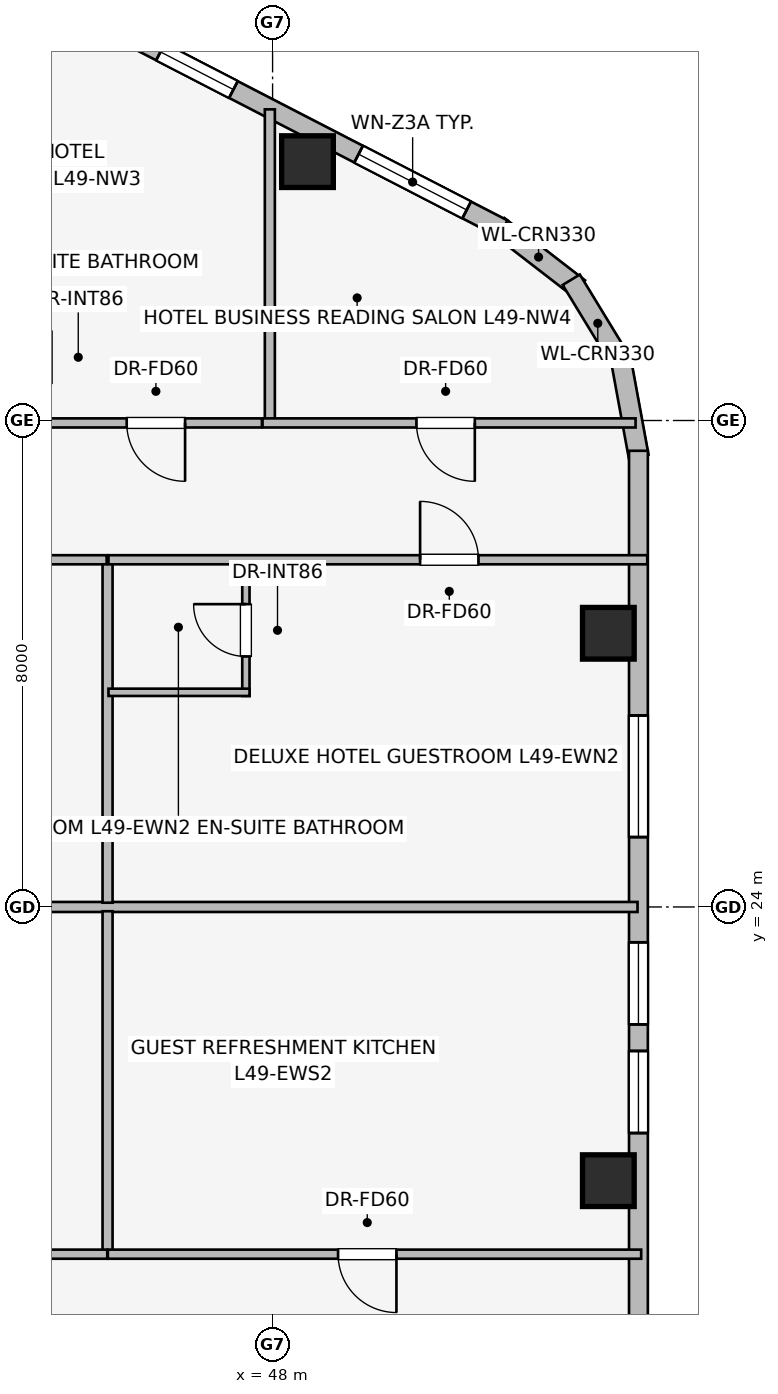
"""IFC4 building model, lengths in metres.
Left out: names, types, materials, properties, quantities, classifications, styles, units other than length and angle.
Written with IfcOpenShell. Run it as: python <this file> out.ifc"""

import sys

from ifc_helpers import new_model, si_unit, direction, frame, frame_2d, origin, origin_2d, place, context, subcontext, project, spatial, rectangle, extrude, element, fill, save


model = new_model("IFC4")
c1 = context("Model", 3, precision=1e-05, world=origin(), true_north=direction((0.0, 1.0)))
c2 = subcontext(c1, "Body", "Model", "MODEL_VIEW")
j1 = project(units=[si_unit("LENGTHUNIT", "METRE"), si_unit("PLANEANGLEUNIT", "RADIAN")], contexts=[c1])
p1 = place(None, origin())
s1 = spatial("IfcSite", under=j1, at=p1, CompositionType="ELEMENT")
p2 = place(p1, origin())
s2 = spatial("IfcBuilding", under=s1, at=p2, CompositionType="ELEMENT")
p3 = place(p2, frame((0.0, 0.0, 180.9)))
s3 = spatial("IfcBuildingStorey", under=s2, at=p3, CompositionType="ELEMENT", Elevation=180.9)
for number, where, z_axis, x_axis in (
    (1, (48.574, 36.257, 0.0), (0.0, 0.0, 1.0), (1.0, 0.0, 0.0)),
    (2, (53.522, 19.499, 0.0), (0.0, 0.0, 1.0), (1.0, 0.0, 0.0)),
    (3, (53.522, 28.501, 0.0), (0.0, 0.0, 1.0), (1.0, 0.0, 0.0)),
):
    element("IfcColumn", number, at=place(p3, frame(where, z_axis=z_axis, x_axis=x_axis)), inside=s3, PredefinedType="COLUMN", context=c2, shape_type="SweptSolid", body=[
        extrude(rectangle(XDim=0.85, YDim=0.85, at=origin_2d()), origin(), (0.0, 0.0, 1.0), 3.45),
    ])
p4 = place(p3, frame((51.711, 35.2, 0.0), z_axis=(0.0, 0.0, 1.0), x_axis=(0.791464279355, -0.611215423976, 0.0)))
e4 = element("IfcWall", 4, at=p4, inside=s3, PredefinedType="STANDARD", context=c2, shape_type="SweptSolid", body=[
    extrude(rectangle(XDim=1.677, YDim=0.33, at=frame_2d((0.838, 0.0))), origin(), (0.0, 0.0, 1.0), 3.19),
])
p5 = place(p3, frame((52.912, 34.315, 0.0), z_axis=(0.0, 0.0, 1.0), x_axis=(0.520219286058, -0.85403272444, 0.0)))
e5 = element("IfcWall", 5, at=p5, inside=s3, PredefinedType="STANDARD", context=c2, shape_type="SweptSolid", body=[
    extrude(rectangle(XDim=1.678, YDim=0.33, at=frame_2d((0.839, 0.0))), origin(), (0.0, 0.0, 1.0), 3.19),
])
p6 = place(p3, frame((53.718, 33.057, 0.0), z_axis=(0.0, 0.0, 1.0), x_axis=(0.180717642671, -0.983535019014, 0.0)))
e6 = element("IfcWall", 6, at=p6, inside=s3, PredefinedType="STANDARD", context=c2, shape_type="SweptSolid", body=[
    extrude(rectangle(XDim=1.677, YDim=0.33, at=frame_2d((0.838, 0.0))), origin(), (0.0, 0.0, 1.0), 3.19),
])
p7 = place(p3, frame((36.838, 42.871, 0.0), z_axis=(0.0, 0.0, 1.0), x_axis=(0.888626188278, -0.458632202867, 0.0)))
e7 = element("IfcWall", 7, at=p7, inside=s3, PredefinedType="STANDARD", context=c2, shape_type="SweptSolid", body=[
    extrude(rectangle(XDim=16.828, YDim=0.31, at=frame_2d((8.414, 0.0))), origin(), (0.0, 0.0, 1.0), 3.19),
])
p8 = place(p7, frame((4.172, 0.0, 0.75)))
e8 = element("IfcOpeningElement", 8, at=p8, cuts=e7, PredefinedType="OPENING", context=c2, shape_type="SweptSolid", body=[
    extrude(rectangle(XDim=1.05, YDim=1.4, at=frame_2d((0.525, 0.7))), frame((0.0, 0.165, 0.0), z_axis=(0.0, -1.0, 0.0), x_axis=(1.0, 0.0, 0.0)), (0.0, 0.0, 1.0), 0.33),
])
p9 = place(p7, frame((6.508, 0.0, 0.75)))
e9 = element("IfcOpeningElement", 9, at=p9, cuts=e7, PredefinedType="OPENING", context=c2, shape_type="SweptSolid", body=[
    extrude(rectangle(XDim=1.35, YDim=1.45, at=frame_2d((0.675, 0.725))), frame((0.0, 0.165, 0.0), z_axis=(0.0, -1.0, 0.0), x_axis=(1.0, 0.0, 0.0)), (0.0, 0.0, 1.0), 0.33),
])
p10 = place(p7, frame((8.497, 0.0, 0.75)))
e10 = element("IfcOpeningElement", 10, at=p10, cuts=e7, PredefinedType="OPENING", context=c2, shape_type="SweptSolid", body=[
    extrude(rectangle(XDim=1.35, YDim=1.45, at=frame_2d((0.675, 0.725))), frame((0.0, 0.165, 0.0), z_axis=(0.0, -1.0, 0.0), x_axis=(1.0, 0.0, 0.0)), (0.0, 0.0, 1.0), 0.33),
])
p11 = place(p7, frame((10.486, 0.0, 0.75)))
e11 = element("IfcOpeningElement", 11, at=p11, cuts=e7, PredefinedType="OPENING", context=c2, shape_type="SweptSolid", body=[
    extrude(rectangle(XDim=1.35, YDim=1.45, at=frame_2d((0.675, 0.725))), frame((0.0, 0.165, 0.0), z_axis=(0.0, -1.0, 0.0), x_axis=(1.0, 0.0, 0.0)), (0.0, 0.0, 1.0), 0.33),
])
p12 = place(p7, frame((14.153, 0.0, 0.75)))
e12 = element("IfcOpeningElement", 12, at=p12, cuts=e7, PredefinedType="OPENING", context=c2, shape_type="SweptSolid", body=[
    extrude(rectangle(XDim=2.0, YDim=1.5, at=frame_2d((1.0, 0.75))), frame((0.0, 0.165, 0.0), z_axis=(0.0, -1.0, 0.0), x_axis=(1.0, 0.0, 0.0)), (0.0, 0.0, 1.0), 0.33),
])
p13 = place(p3, frame((54.017, 31.502, 0.0), z_axis=(0.0, 0.0, 1.0), x_axis=(0.0, -1.0, 0.0)))
e13 = element("IfcWall", 13, at=p13, inside=s3, PredefinedType="STANDARD", context=c2, shape_type="SweptSolid", body=[
    extrude(rectangle(XDim=15.004, YDim=0.31, at=frame_2d((7.502, 0.0))), origin(), (0.0, 0.0, 1.0), 3.19),
])
p14 = place(p13, frame((4.353, 0.0, 0.75)))
e14 = element("IfcOpeningElement", 14, at=p14, cuts=e13, PredefinedType="OPENING", context=c2, shape_type="SweptSolid", body=[
    extrude(rectangle(XDim=2.0, YDim=1.5, at=frame_2d((1.0, 0.75))), frame((0.0, 0.165, 0.0), z_axis=(0.0, -1.0, 0.0), x_axis=(1.0, 0.0, 0.0)), (0.0, 0.0, 1.0), 0.33),
])
p15 = place(p13, frame((8.083, 0.0, 0.75)))
e15 = element("IfcOpeningElement", 15, at=p15, cuts=e13, PredefinedType="OPENING", context=c2, shape_type="SweptSolid", body=[
    extrude(rectangle(XDim=1.35, YDim=1.45, at=frame_2d((0.675, 0.725))), frame((0.0, 0.165, 0.0), z_axis=(0.0, -1.0, 0.0), x_axis=(1.0, 0.0, 0.0)), (0.0, 0.0, 1.0), 0.33),
])
p16 = place(p13, frame((9.87, 0.0, 0.75)))
e16 = element("IfcOpeningElement", 16, at=p16, cuts=e13, PredefinedType="OPENING", context=c2, shape_type="SweptSolid", body=[
    extrude(rectangle(XDim=1.35, YDim=1.45, at=frame_2d((0.675, 0.725))), frame((0.0, 0.165, 0.0), z_axis=(0.0, -1.0, 0.0), x_axis=(1.0, 0.0, 0.0)), (0.0, 0.0, 1.0), 0.33),
])
p17 = place(p3, frame((47.955, 31.97, 0.0), z_axis=(0.0, 0.0, 1.0), x_axis=(0.0, 1.0, 0.0)))
e17 = element("IfcWall", 17, at=p17, inside=s3, PredefinedType="PARTITIONING", context=c2, shape_type="SweptSolid", body=[
    extrude(rectangle(XDim=5.147, YDim=0.165, at=frame_2d((2.573, 0.0))), origin(), (0.0, 0.0, 1.0), 3.19),
])
p18 = place(p3, frame((47.825, 31.96, 0.0), z_axis=(0.0, 0.0, 1.0), x_axis=(-1.0, 0.0, 0.0)))
e18 = element("IfcWall", 18, at=p18, inside=s3, PredefinedType="PARTITIONING", context=c2, shape_type="SweptSolid", body=[
    extrude(rectangle(XDim=5.801, YDim=0.15, at=frame_2d((2.9, 0.0))), origin(), (0.0, 0.0, 1.0), 3.19),
])
p19 = place(p18, frame((1.264, 0.0, 0.0)))
e19 = element("IfcOpeningElement", 19, at=p19, cuts=e18, PredefinedType="OPENING", context=c2, shape_type="SweptSolid", body=[
    extrude(rectangle(XDim=0.96, YDim=2.0, at=frame_2d((0.48, 1.0))), frame((0.0, 0.085, 0.0), z_axis=(0.0, -1.0, 0.0), x_axis=(1.0, 0.0, 0.0)), (0.0, 0.0, 1.0), 0.17),
])
p20 = place(p3, frame((53.97, 31.96, 0.0), z_axis=(0.0, 0.0, 1.0), x_axis=(-1.0, 0.0, 0.0)))
e20 = element("IfcWall", 20, at=p20, inside=s3, PredefinedType="PARTITIONING", context=c2, shape_type="SweptSolid", body=[
    extrude(rectangle(XDim=6.135, YDim=0.15, at=frame_2d((3.067, 0.0))), origin(), (0.0, 0.0, 1.0), 3.19),
])
p21 = place(p20, frame((2.644, 0.0, 0.0)))
e21 = element("IfcOpeningElement", 21, at=p21, cuts=e20, PredefinedType="OPENING", context=c2, shape_type="SweptSolid", body=[
    extrude(rectangle(XDim=0.96, YDim=2.0, at=frame_2d((0.48, 1.0))), frame((0.0, 0.085, 0.0), z_axis=(0.0, -1.0, 0.0), x_axis=(1.0, 0.0, 0.0)), (0.0, 0.0, 1.0), 0.17),
])
p22 = place(p3, frame((40.52, 24.0, 0.0), z_axis=(0.0, 0.0, 1.0), x_axis=(1.0, 0.0, 0.0)))
e22 = element("IfcWall", 22, at=p22, inside=s3, PredefinedType="PARTITIONING", context=c2, shape_type="SweptSolid", body=[
    extrude(rectangle(XDim=13.482, YDim=0.165, at=frame_2d((6.741, 0.0))), origin(), (0.0, 0.0, 1.0), 3.19),
])
p23 = place(p3, frame((45.286, 24.07, 0.0), z_axis=(0.0, 0.0, 1.0), x_axis=(0.0, 1.0, 0.0)))
e23 = element("IfcWall", 23, at=p23, inside=s3, PredefinedType="PARTITIONING", context=c2, shape_type="SweptSolid", body=[
    extrude(rectangle(XDim=5.64, YDim=0.165, at=frame_2d((2.82, 0.0))), origin(), (0.0, 0.0, 1.0), 3.19),
])
p24 = place(p3, frame((39.95, 29.71, 0.0), z_axis=(0.0, 0.0, 1.0), x_axis=(1.0, 0.0, 0.0)))
e24 = element("IfcWall", 24, at=p24, inside=s3, PredefinedType="PARTITIONING", context=c2, shape_type="SweptSolid", body=[
    extrude(rectangle(XDim=5.321, YDim=0.15, at=frame_2d((2.661, 0.0))), origin(), (0.0, 0.0, 1.0), 3.19),
])
p25 = place(p24, frame((2.18, 0.0, 0.0)))
e25 = element("IfcOpeningElement", 25, at=p25, cuts=e24, PredefinedType="OPENING", context=c2, shape_type="SweptSolid", body=[
    extrude(rectangle(XDim=0.96, YDim=2.0, at=frame_2d((0.48, 1.0))), frame((0.0, 0.085, 0.0), z_axis=(0.0, -1.0, 0.0), x_axis=(1.0, 0.0, 0.0)), (0.0, 0.0, 1.0), 0.17),
])
p26 = place(p3, frame((47.561, 27.47, 0.0), z_axis=(0.0, 0.0, 1.0), x_axis=(0.0, 1.0, 0.0)))
e26 = element("IfcWall", 26, at=p26, inside=s3, PredefinedType="PARTITIONING", context=c2, shape_type="SweptSolid", body=[
    extrude(rectangle(XDim=2.24, YDim=0.12, at=frame_2d((1.12, 0.0))), origin(), (0.0, 0.0, 1.0), 3.19),
])
p27 = place(p26, frame((0.65, 0.0, 0.0)))
e27 = element("IfcOpeningElement", 27, at=p27, cuts=e26, PredefinedType="OPENING", context=c2, shape_type="SweptSolid", body=[
    extrude(rectangle(XDim=0.86, YDim=2.0, at=frame_2d((0.43, 1.0))), frame((0.0, 0.07, 0.0), z_axis=(0.0, -1.0, 0.0), x_axis=(1.0, 0.0, 0.0)), (0.0, 0.0, 1.0), 0.14),
])
p28 = place(p3, frame((45.301, 27.53, 0.0), z_axis=(0.0, 0.0, 1.0), x_axis=(1.0, 0.0, 0.0)))
e28 = element("IfcWall", 28, at=p28, inside=s3, PredefinedType="PARTITIONING", context=c2, shape_type="SweptSolid", body=[
    extrude(rectangle(XDim=2.32, YDim=0.12, at=frame_2d((1.16, 0.0))), origin(), (0.0, 0.0, 1.0), 3.19),
])
p29 = place(p3, frame((45.301, 29.71, 0.0), z_axis=(0.0, 0.0, 1.0), x_axis=(1.0, 0.0, 0.0)))
e29 = element("IfcWall", 29, at=p29, inside=s3, PredefinedType="PARTITIONING", context=c2, shape_type="SweptSolid", body=[
    extrude(rectangle(XDim=8.861, YDim=0.15, at=frame_2d((4.431, 0.0))), origin(), (0.0, 0.0, 1.0), 3.19),
])
p30 = place(p29, frame((5.125, 0.0, 0.0)))
e30 = element("IfcOpeningElement", 30, at=p30, cuts=e29, PredefinedType="OPENING", context=c2, shape_type="SweptSolid", body=[
    extrude(rectangle(XDim=0.96, YDim=2.0, at=frame_2d((0.48, 1.0))), frame((0.0, 0.085, 0.0), z_axis=(0.0, -1.0, 0.0), x_axis=(1.0, 0.0, 0.0)), (0.0, 0.0, 1.0), 0.17),
])
p31 = place(p3, frame((45.286, 18.29, 0.0), z_axis=(0.0, 0.0, 1.0), x_axis=(0.0, 1.0, 0.0)))
e31 = element("IfcWall", 31, at=p31, inside=s3, PredefinedType="PARTITIONING", context=c2, shape_type="SweptSolid", body=[
    extrude(rectangle(XDim=5.64, YDim=0.165, at=frame_2d((2.82, 0.0))), origin(), (0.0, 0.0, 1.0), 3.19),
])
p32 = place(p3, frame((45.281, 18.29, 0.0), z_axis=(0.0, 0.0, 1.0), x_axis=(-1.0, 0.0, 0.0)))
e32 = element("IfcWall", 32, at=p32, inside=s3, PredefinedType="PARTITIONING", context=c2, shape_type="SweptSolid", body=[
    extrude(rectangle(XDim=5.081, YDim=0.15, at=frame_2d((2.541, 0.0))), origin(), (0.0, 0.0, 1.0), 3.19),
])
p33 = place(p32, frame((1.94, 0.0, 0.0)))
e33 = element("IfcOpeningElement", 33, at=p33, cuts=e32, PredefinedType="OPENING", context=c2, shape_type="SweptSolid", body=[
    extrude(rectangle(XDim=0.96, YDim=2.0, at=frame_2d((0.48, 1.0))), frame((0.0, 0.085, 0.0), z_axis=(0.0, -1.0, 0.0), x_axis=(1.0, 0.0, 0.0)), (0.0, 0.0, 1.0), 0.17),
])
p34 = place(p3, frame((54.062, 18.29, 0.0), z_axis=(0.0, 0.0, 1.0), x_axis=(-1.0, 0.0, 0.0)))
e34 = element("IfcWall", 34, at=p34, inside=s3, PredefinedType="PARTITIONING", context=c2, shape_type="SweptSolid", body=[
    extrude(rectangle(XDim=8.771, YDim=0.15, at=frame_2d((4.385, 0.0))), origin(), (0.0, 0.0, 1.0), 3.19),
])
p35 = place(p34, frame((4.025, 0.0, 0.0)))
e35 = element("IfcOpeningElement", 35, at=p35, cuts=e34, PredefinedType="OPENING", context=c2, shape_type="SweptSolid", body=[
    extrude(rectangle(XDim=0.96, YDim=2.0, at=frame_2d((0.48, 1.0))), frame((0.0, 0.085, 0.0), z_axis=(0.0, -1.0, 0.0), x_axis=(1.0, 0.0, 0.0)), (0.0, 0.0, 1.0), 0.17),
])
p36 = place(p11, origin())
e36 = element("IfcWindow", 36, at=p36, inside=s3, PartitioningType="SINGLE_PANEL", PredefinedType="WINDOW", context=c2, shape_type="SweptSolid", body=[
    extrude(rectangle(XDim=1.35, YDim=1.45, at=frame_2d((0.675, 0.725))), frame((0.0, 0.03, 0.0), z_axis=(0.0, -1.0, 0.0), x_axis=(1.0, 0.0, 0.0)), (0.0, 0.0, 1.0), 0.06),
])
fill(e11, e36)
p37 = place(p12, origin())
e37 = element("IfcWindow", 37, at=p37, inside=s3, PartitioningType="SINGLE_PANEL", PredefinedType="WINDOW", context=c2, shape_type="SweptSolid", body=[
    extrude(rectangle(XDim=2.0, YDim=1.5, at=frame_2d((1.0, 0.75))), frame((0.0, 0.03, 0.0), z_axis=(0.0, -1.0, 0.0), x_axis=(1.0, 0.0, 0.0)), (0.0, 0.0, 1.0), 0.06),
])
fill(e12, e37)
p38 = place(p14, origin())
e38 = element("IfcWindow", 38, at=p38, inside=s3, PartitioningType="SINGLE_PANEL", PredefinedType="WINDOW", context=c2, shape_type="SweptSolid", body=[
    extrude(rectangle(XDim=2.0, YDim=1.5, at=frame_2d((1.0, 0.75))), frame((0.0, 0.03, 0.0), z_axis=(0.0, -1.0, 0.0), x_axis=(1.0, 0.0, 0.0)), (0.0, 0.0, 1.0), 0.06),
])
fill(e14, e38)
p39 = place(p15, origin())
e39 = element("IfcWindow", 39, at=p39, inside=s3, PartitioningType="SINGLE_PANEL", PredefinedType="WINDOW", context=c2, shape_type="SweptSolid", body=[
    extrude(rectangle(XDim=1.35, YDim=1.45, at=frame_2d((0.675, 0.725))), frame((0.0, 0.03, 0.0), z_axis=(0.0, -1.0, 0.0), x_axis=(1.0, 0.0, 0.0)), (0.0, 0.0, 1.0), 0.06),
])
fill(e15, e39)
p40 = place(p16, origin())
e40 = element("IfcWindow", 40, at=p40, inside=s3, PartitioningType="SINGLE_PANEL", PredefinedType="WINDOW", context=c2, shape_type="SweptSolid", body=[
    extrude(rectangle(XDim=1.35, YDim=1.45, at=frame_2d((0.675, 0.725))), frame((0.0, 0.03, 0.0), z_axis=(0.0, -1.0, 0.0), x_axis=(1.0, 0.0, 0.0)), (0.0, 0.0, 1.0), 0.06),
])
fill(e16, e40)
p41 = place(p19, origin())
e41 = element("IfcDoor", 41, at=p41, inside=s3, OperationType="SINGLE_SWING_LEFT", PredefinedType="DOOR", context=c2, shape_type="SweptSolid", body=[
    extrude(rectangle(XDim=0.96, YDim=2.0, at=frame_2d((0.48, 1.0))), frame((0.0, 0.025, 0.0), z_axis=(0.0, -1.0, 0.0), x_axis=(1.0, 0.0, 0.0)), (0.0, 0.0, 1.0), 0.05),
])
fill(e19, e41)
p42 = place(p21, origin())
e42 = element("IfcDoor", 42, at=p42, inside=s3, OperationType="SINGLE_SWING_LEFT", PredefinedType="DOOR", context=c2, shape_type="SweptSolid", body=[
    extrude(rectangle(XDim=0.96, YDim=2.0, at=frame_2d((0.48, 1.0))), frame((0.0, 0.025, 0.0), z_axis=(0.0, -1.0, 0.0), x_axis=(1.0, 0.0, 0.0)), (0.0, 0.0, 1.0), 0.05),
])
fill(e21, e42)
p43 = place(p27, origin())
e43 = element("IfcDoor", 43, at=p43, inside=s3, OperationType="SINGLE_SWING_RIGHT", PredefinedType="DOOR", context=c2, shape_type="SweptSolid", body=[
    extrude(rectangle(XDim=0.86, YDim=2.0, at=frame_2d((0.43, 1.0))), frame((0.0, 0.025, 0.0), z_axis=(0.0, -1.0, 0.0), x_axis=(1.0, 0.0, 0.0)), (0.0, 0.0, 1.0), 0.05),
])
fill(e27, e43)
p44 = place(p30, origin())
e44 = element("IfcDoor", 44, at=p44, inside=s3, OperationType="SINGLE_SWING_LEFT", PredefinedType="DOOR", context=c2, shape_type="SweptSolid", body=[
    extrude(rectangle(XDim=0.96, YDim=2.0, at=frame_2d((0.48, 1.0))), frame((0.0, 0.025, 0.0), z_axis=(0.0, -1.0, 0.0), x_axis=(1.0, 0.0, 0.0)), (0.0, 0.0, 1.0), 0.05),
])
fill(e30, e44)
p45 = place(p35, origin())
e45 = element("IfcDoor", 45, at=p45, inside=s3, OperationType="SINGLE_SWING_LEFT", PredefinedType="DOOR", context=c2, shape_type="SweptSolid", body=[
    extrude(rectangle(XDim=0.96, YDim=2.0, at=frame_2d((0.48, 1.0))), frame((0.0, 0.025, 0.0), z_axis=(0.0, -1.0, 0.0), x_axis=(1.0, 0.0, 0.0)), (0.0, 0.0, 1.0), 0.05),
])
fill(e35, e45)
save(model, sys.argv[1])
